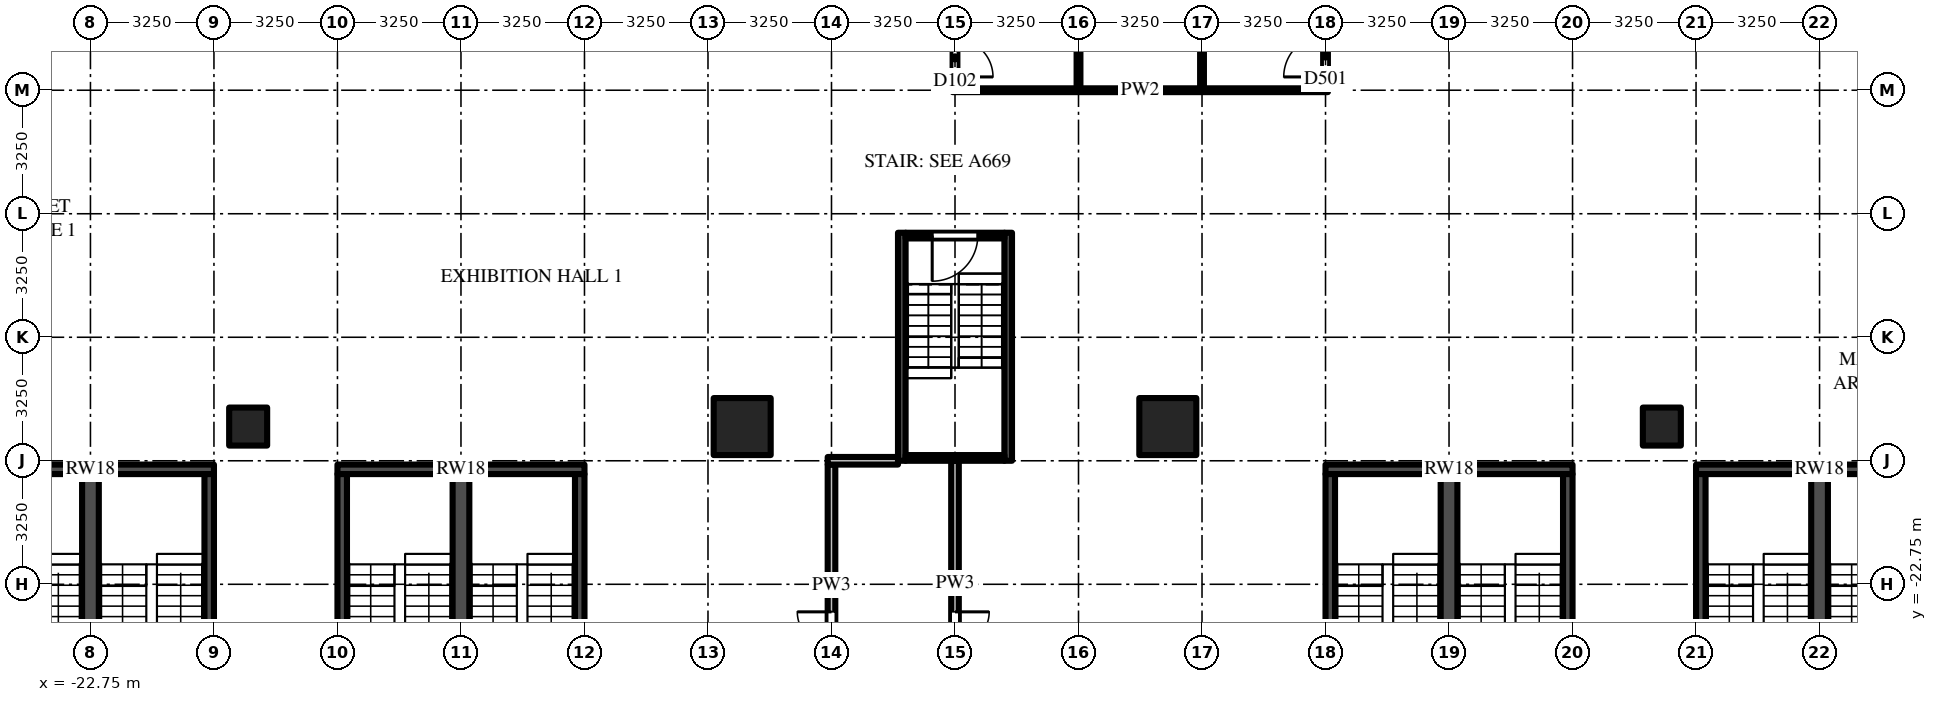
"""IFC4 building model, lengths in metres.
Left out: names, types, materials, properties, quantities, classifications, styles, units other than length and angle.
Written with IfcOpenShell. Run it as: python <this file> out.ifc"""

import sys

from ifc_helpers import new_model, si_unit, direction, frame, frame_2d, origin, origin_2d, place, context, subcontext, project, spatial, rectangle, extrude, source, transform, mapped, element, fill, save


model = new_model("IFC4")
c1 = context("Model", 3, precision=1e-05, world=origin(), true_north=direction((0.0, 1.0)))
c2 = subcontext(c1, "Body", "Model", "MODEL_VIEW")
j1 = project(units=[si_unit("LENGTHUNIT", "METRE"), si_unit("PLANEANGLEUNIT", "RADIAN")], contexts=[c1])
p1 = place(None, origin())
s1 = spatial("IfcSite", under=j1, at=p1, CompositionType="ELEMENT")
p2 = place(p1, origin())
s2 = spatial("IfcBuilding", under=s1, at=p2, CompositionType="ELEMENT")
p3 = place(p2, frame((0.0, 0.0, 24.0)))
s3 = spatial("IfcBuildingStorey", under=s2, at=p3, CompositionType="ELEMENT", Elevation=24.0)
m1 = source(origin(), c2, "Body", "SweptSolid", [
    extrude(rectangle(XDim=1.5, YDim=1.5, at=origin_2d()), origin(), (0.0, 0.0, 1.0), 5.0),
])
p4 = place(p3, frame((5.6, -18.6, 0.0), z_axis=(0.0, 0.0, 1.0), x_axis=(1.0, 0.0, 0.0)))
e1 = element("IfcColumn", 1, at=p4, inside=s3, PredefinedType="COLUMN", context=c2, shape_type="MappedRepresentation", body=[
    mapped(m1, transform((0.0, 0.0, 0.0))),
])
m2 = source(origin(), c2, "Body", "SweptSolid", [
    extrude(rectangle(XDim=1.0, YDim=1.0, at=origin_2d()), origin(), (0.0, 0.0, 1.0), 5.0),
])
p5 = place(p3, frame((18.6, -18.6, 0.0), z_axis=(0.0, 0.0, 1.0), x_axis=(1.0, 0.0, 0.0)))
e2 = element("IfcColumn", 2, at=p5, inside=s3, PredefinedType="COLUMN", context=c2, shape_type="MappedRepresentation", body=[
    mapped(m2, transform((0.0, 0.0, 0.0))),
])
p6 = place(p3, frame((-5.6, -18.6, 0.0), z_axis=(0.0, 0.0, 1.0), x_axis=(1.0, 0.0, 0.0)))
e3 = element("IfcColumn", 3, at=p6, inside=s3, PredefinedType="COLUMN", context=c2, shape_type="MappedRepresentation", body=[
    mapped(m1, transform((0.0, 0.0, 0.0))),
])
p7 = place(p3, frame((-18.6, -18.6, 0.0), z_axis=(0.0, 0.0, 1.0), x_axis=(1.0, 0.0, 0.0)))
e4 = element("IfcColumn", 4, at=p7, inside=s3, PredefinedType="COLUMN", context=c2, shape_type="MappedRepresentation", body=[
    mapped(m2, transform((0.0, 0.0, 0.0))),
])
m3 = source(origin(), c2, "Body", "SweptSolid", [
    extrude(rectangle(XDim=6.0, YDim=0.2, at=frame_2d((3.0, 0.0))), origin(), (0.0, 0.0, 1.0), 4.7),
])
for number, where, z_axis, x_axis in (
    (5, (1.4, -13.5, 0.0), (0.0, 0.0, 1.0), (0.0, -1.0, 0.0)),
    (6, (-1.4, -13.5, 0.0), (0.0, 0.0, 1.0), (0.0, -1.0, 0.0)),
):
    element("IfcWall", number, at=place(p3, frame(where, z_axis=z_axis, x_axis=x_axis)), inside=s3, PredefinedType="SHEAR", context=c2, shape_type="MappedRepresentation", body=[
        mapped(m3, transform((0.0, 0.0, 0.0))),
    ])
m4 = source(origin(), c2, "Body", "SweptSolid", [
    extrude(rectangle(XDim=2.6, YDim=0.15, at=frame_2d((1.3, 0.0))), origin(), (0.0, 0.0, 1.0), 4.7),
])
p8 = place(p3, frame((1.3, -13.575, 0.0), z_axis=(0.0, 0.0, 1.0), x_axis=(-1.0, 0.0, 0.0)))
e7 = element("IfcWall", 7, at=p8, inside=s3, PredefinedType="SHEAR", context=c2, shape_type="MappedRepresentation", body=[
    mapped(m4, transform((0.0, 0.0, 0.0))),
])
m5 = source(origin(), c2, "Body", "SweptSolid", [
    extrude(rectangle(XDim=1.2, YDim=2.1, at=frame_2d((0.6, 1.05))), frame((0.0, 0.085, 0.0), z_axis=(0.0, -1.0, 0.0), x_axis=(1.0, 0.0, 0.0)), (0.0, 0.0, 1.0), 0.17),
])
p9 = place(p8, frame((0.7, 0.0, 0.0)))
e8 = element("IfcOpeningElement", 8, at=p9, cuts=e7, PredefinedType="OPENING", context=c2, shape_type="MappedRepresentation", body=[
    mapped(m5, transform((0.0, 0.0, 0.0))),
])
p10 = place(p3, frame((1.3, -19.425, 0.0), z_axis=(0.0, 0.0, 1.0), x_axis=(-1.0, 0.0, 0.0)))
e9 = element("IfcWall", 9, at=p10, inside=s3, PredefinedType="SHEAR", context=c2, shape_type="MappedRepresentation", body=[
    mapped(m4, transform((0.0, 0.0, 0.0))),
])
m6 = source(origin(), c2, "Body", "SweptSolid", [
    extrude(rectangle(XDim=6.5, YDim=0.25, at=frame_2d((3.25, 0.0))), origin(), (0.0, 0.0, 1.0), 4.7),
])
p11 = place(p3, frame((-26.0, -19.725, 0.0), z_axis=(0.0, 0.0, 1.0), x_axis=(1.0, 0.0, 0.0)))
e10 = element("IfcWall", 10, at=p11, inside=s3, PredefinedType="SHEAR", context=c2, shape_type="MappedRepresentation", body=[
    mapped(m6, transform((0.0, 0.0, 0.0))),
])
m7 = source(origin(), c2, "Body", "SweptSolid", [
    extrude(rectangle(XDim=8.3, YDim=0.25, at=frame_2d((4.15, 0.0))), origin(), (0.0, 0.0, 1.0), 4.7),
])
p12 = place(p3, frame((-19.625, -28.15, 0.0), z_axis=(0.0, 0.0, 1.0), x_axis=(0.0, 1.0, 0.0)))
e11 = element("IfcWall", 11, at=p12, inside=s3, PredefinedType="SHEAR", context=c2, shape_type="MappedRepresentation", body=[
    mapped(m7, transform((0.0, 0.0, 0.0))),
])
m8 = source(origin(), c2, "Body", "SweptSolid", [
    extrude(rectangle(XDim=8.3, YDim=0.44, at=frame_2d((4.15, 0.0))), origin(), (0.0, 0.0, 1.0), 4.7),
])
p13 = place(p3, frame((-22.75, -28.15, 0.0), z_axis=(0.0, 0.0, 1.0), x_axis=(0.0, 1.0, 0.0)))
e12 = element("IfcWall", 12, at=p13, inside=s3, PredefinedType="SHEAR", context=c2, shape_type="MappedRepresentation", body=[
    mapped(m8, transform((0.0, 0.0, 0.0))),
])
p14 = place(p3, frame((-16.25, -19.725, 0.0), z_axis=(0.0, 0.0, 1.0), x_axis=(1.0, 0.0, 0.0)))
e13 = element("IfcWall", 13, at=p14, inside=s3, PredefinedType="SHEAR", context=c2, shape_type="MappedRepresentation", body=[
    mapped(m6, transform((0.0, 0.0, 0.0))),
])
for number, where, z_axis, x_axis in (
    (14, (-16.125, -28.15, 0.0), (0.0, 0.0, 1.0), (0.0, 1.0, 0.0)),
    (15, (-9.875, -28.15, 0.0), (0.0, 0.0, 1.0), (0.0, 1.0, 0.0)),
):
    element("IfcWall", number, at=place(p3, frame(where, z_axis=z_axis, x_axis=x_axis)), inside=s3, PredefinedType="SHEAR", context=c2, shape_type="MappedRepresentation", body=[
        mapped(m7, transform((0.0, 0.0, 0.0))),
    ])
p15 = place(p3, frame((-13.0, -28.15, 0.0), z_axis=(0.0, 0.0, 1.0), x_axis=(0.0, 1.0, 0.0)))
e16 = element("IfcWall", 16, at=p15, inside=s3, PredefinedType="SHEAR", context=c2, shape_type="MappedRepresentation", body=[
    mapped(m8, transform((0.0, 0.0, 0.0))),
])
p16 = place(p3, frame((9.75, -19.725, 0.0), z_axis=(0.0, 0.0, 1.0), x_axis=(1.0, 0.0, 0.0)))
e17 = element("IfcWall", 17, at=p16, inside=s3, PredefinedType="SHEAR", context=c2, shape_type="MappedRepresentation", body=[
    mapped(m6, transform((0.0, 0.0, 0.0))),
])
for number, where, z_axis, x_axis in (
    (18, (9.875, -28.15, 0.0), (0.0, 0.0, 1.0), (0.0, 1.0, 0.0)),
    (19, (16.125, -28.15, 0.0), (0.0, 0.0, 1.0), (0.0, 1.0, 0.0)),
):
    element("IfcWall", number, at=place(p3, frame(where, z_axis=z_axis, x_axis=x_axis)), inside=s3, PredefinedType="SHEAR", context=c2, shape_type="MappedRepresentation", body=[
        mapped(m7, transform((0.0, 0.0, 0.0))),
    ])
p17 = place(p3, frame((13.0, -28.15, 0.0), z_axis=(0.0, 0.0, 1.0), x_axis=(0.0, 1.0, 0.0)))
e20 = element("IfcWall", 20, at=p17, inside=s3, PredefinedType="SHEAR", context=c2, shape_type="MappedRepresentation", body=[
    mapped(m8, transform((0.0, 0.0, 0.0))),
])
p18 = place(p3, frame((19.5, -19.725, 0.0), z_axis=(0.0, 0.0, 1.0), x_axis=(1.0, 0.0, 0.0)))
e21 = element("IfcWall", 21, at=p18, inside=s3, PredefinedType="SHEAR", context=c2, shape_type="MappedRepresentation", body=[
    mapped(m6, transform((0.0, 0.0, 0.0))),
])
p19 = place(p3, frame((19.625, -28.15, 0.0), z_axis=(0.0, 0.0, 1.0), x_axis=(0.0, 1.0, 0.0)))
e22 = element("IfcWall", 22, at=p19, inside=s3, PredefinedType="SHEAR", context=c2, shape_type="MappedRepresentation", body=[
    mapped(m7, transform((0.0, 0.0, 0.0))),
])
p20 = place(p3, frame((22.75, -28.15, 0.0), z_axis=(0.0, 0.0, 1.0), x_axis=(0.0, 1.0, 0.0)))
e23 = element("IfcWall", 23, at=p20, inside=s3, PredefinedType="SHEAR", context=c2, shape_type="MappedRepresentation", body=[
    mapped(m8, transform((0.0, 0.0, 0.0))),
])
m9 = source(origin(), c2, "Body", "SweptSolid", [
    extrude(rectangle(XDim=3.188, YDim=0.2, at=frame_2d((1.594, 0.0))), origin(), (0.0, 0.0, 1.0), 4.7),
])
p21 = place(p3, frame((-3.25, -25.938, 0.0), z_axis=(0.0, 0.0, 1.0), x_axis=(0.0, 1.0, 0.0)))
e24 = element("IfcWall", 24, at=p21, inside=s3, PredefinedType="PARTITIONING", context=c2, shape_type="MappedRepresentation", body=[
    mapped(m9, transform((0.0, 0.0, 0.0))),
])
m10 = source(origin(), c2, "Body", "SweptSolid", [
    extrude(rectangle(XDim=1.8, YDim=2.1, at=frame_2d((0.9, 1.05))), frame((0.0, 0.11, 0.0), z_axis=(0.0, -1.0, 0.0), x_axis=(1.0, 0.0, 0.0)), (0.0, 0.0, 1.0), 0.22),
])
p22 = place(p21, frame((0.663, 0.0, 0.0)))
e25 = element("IfcOpeningElement", 25, at=p22, cuts=e24, PredefinedType="OPENING", context=c2, shape_type="MappedRepresentation", body=[
    mapped(m10, transform((0.0, 0.0, 0.0))),
])
m11 = source(origin(), c2, "Body", "SweptSolid", [
    extrude(rectangle(XDim=3.15, YDim=0.2, at=frame_2d((1.575, 0.0))), origin(), (0.0, 0.0, 1.0), 4.7),
])
p23 = place(p3, frame((-3.25, -22.75, 0.0), z_axis=(0.0, 0.0, 1.0), x_axis=(0.0, 1.0, 0.0)))
e26 = element("IfcWall", 26, at=p23, inside=s3, PredefinedType="PARTITIONING", context=c2, shape_type="MappedRepresentation", body=[
    mapped(m11, transform((0.0, 0.0, 0.0))),
])
m12 = source(origin(), c2, "Body", "SweptSolid", [
    extrude(rectangle(XDim=3.188, YDim=0.2, at=frame_2d((1.594, 0.0))), origin(), (0.0, 0.0, 1.0), 3.996),
])
p24 = place(p3, frame((0.0, -22.75, 0.0), z_axis=(0.0, 0.0, 1.0), x_axis=(0.0, -1.0, 0.0)))
e27 = element("IfcWall", 27, at=p24, inside=s3, PredefinedType="PARTITIONING", context=c2, shape_type="MappedRepresentation", body=[
    mapped(m12, transform((0.0, 0.0, 0.0))),
])
p25 = place(p24, frame((0.725, 0.0, 0.0)))
e28 = element("IfcOpeningElement", 28, at=p25, cuts=e27, PredefinedType="OPENING", context=c2, shape_type="MappedRepresentation", body=[
    mapped(m10, transform((0.0, 0.0, 0.0))),
])
m13 = source(origin(), c2, "Body", "SweptSolid", [
    extrude(rectangle(XDim=3.25, YDim=0.2, at=frame_2d((1.625, 0.0))), origin(), (0.0, 0.0, 1.0), 3.996),
])
p26 = place(p3, frame((0.0, -22.75, 0.0), z_axis=(0.0, 0.0, 1.0), x_axis=(0.0, 1.0, 0.0)))
e29 = element("IfcWall", 29, at=p26, inside=s3, PredefinedType="PARTITIONING", context=c2, shape_type="MappedRepresentation", body=[
    mapped(m13, transform((0.0, 0.0, 0.0))),
])
m14 = source(origin(), c2, "Body", "SweptSolid", [
    extrude(rectangle(XDim=3.137, YDim=0.125, at=frame_2d((1.569, 0.0))), origin(), (0.0, 0.0, 1.0), 4.077),
])
p27 = place(p3, frame((0.0, -6.562, 0.0), z_axis=(0.0, 0.0, 1.0), x_axis=(0.0, -1.0, 0.0)))
e30 = element("IfcWall", 30, at=p27, inside=s3, PredefinedType="PARTITIONING", context=c2, shape_type="MappedRepresentation", body=[
    mapped(m14, transform((0.0, 0.0, 0.0))),
])
m15 = source(origin(), c2, "Body", "SweptSolid", [
    extrude(rectangle(XDim=1.0, YDim=2.1, at=frame_2d((0.5, 1.05))), frame((0.0, 0.073, 0.0), z_axis=(0.0, -1.0, 0.0), x_axis=(1.0, 0.0, 0.0)), (0.0, 0.0, 1.0), 0.145),
])
p28 = place(p27, frame((1.837, 0.0, 0.0)))
e31 = element("IfcOpeningElement", 31, at=p28, cuts=e30, PredefinedType="OPENING", context=c2, shape_type="MappedRepresentation", body=[
    mapped(m15, transform((0.0, 0.0, 0.0))),
])
m16 = source(origin(), c2, "Body", "SweptSolid", [
    extrude(rectangle(XDim=3.137, YDim=0.1, at=frame_2d((1.569, 0.0))), origin(), (0.0, 0.0, 1.0), 4.7),
])
p29 = place(p3, frame((3.25, -9.7, 0.0), z_axis=(0.0, 0.0, 1.0), x_axis=(0.0, 1.0, 0.0)))
e32 = element("IfcWall", 32, at=p29, inside=s3, PredefinedType="PARTITIONING", context=c2, shape_type="MappedRepresentation", body=[
    mapped(m16, transform((0.0, 0.0, 0.0))),
])
m17 = source(origin(), c2, "Body", "SweptSolid", [
    extrude(rectangle(XDim=3.137, YDim=0.1, at=frame_2d((1.569, 0.0))), origin(), (0.0, 0.0, 1.0), 3.996),
])
p30 = place(p3, frame((6.5, -9.7, 0.0), z_axis=(0.0, 0.0, 1.0), x_axis=(0.0, 1.0, 0.0)))
e33 = element("IfcWall", 33, at=p30, inside=s3, PredefinedType="PARTITIONING", context=c2, shape_type="MappedRepresentation", body=[
    mapped(m17, transform((0.0, 0.0, 0.0))),
])
m18 = source(origin(), c2, "Body", "SweptSolid", [
    extrude(rectangle(XDim=3.2, YDim=0.125, at=frame_2d((1.6, 0.0))), origin(), (0.0, 0.0, 1.0), 3.996),
])
p31 = place(p3, frame((9.75, -9.7, 0.0), z_axis=(0.0, 0.0, 1.0), x_axis=(0.0, 1.0, 0.0)))
e34 = element("IfcWall", 34, at=p31, inside=s3, PredefinedType="PARTITIONING", context=c2, shape_type="MappedRepresentation", body=[
    mapped(m18, transform((0.0, 0.0, 0.0))),
])
m19 = source(origin(), c2, "Body", "SweptSolid", [
    extrude(rectangle(XDim=1.1, YDim=2.1, at=frame_2d((0.55, 1.05))), frame((0.0, 0.073, 0.0), z_axis=(0.0, -1.0, 0.0), x_axis=(1.0, 0.0, 0.0)), (0.0, 0.0, 1.0), 0.145),
])
p32 = place(p31, frame((0.3, 0.0, 0.0)))
e35 = element("IfcOpeningElement", 35, at=p32, cuts=e34, PredefinedType="OPENING", context=c2, shape_type="MappedRepresentation", body=[
    mapped(m19, transform((0.0, 0.0, 0.0))),
])
m20 = source(origin(), c2, "Body", "SweptSolid", [
    extrude(rectangle(XDim=1.85, YDim=0.2, at=frame_2d((0.925, 0.0))), origin(), (0.0, 0.0, 1.0), 3.996),
])
p33 = place(p3, frame((-3.35, -19.5, 0.0), z_axis=(0.0, 0.0, 1.0), x_axis=(1.0, 0.0, 0.0)))
e36 = element("IfcWall", 36, at=p33, inside=s3, PredefinedType="PARTITIONING", context=c2, shape_type="MappedRepresentation", body=[
    mapped(m20, transform((0.0, 0.0, 0.0))),
])
m21 = source(origin(), c2, "Body", "SweptSolid", [
    extrude(rectangle(XDim=9.875, YDim=0.1, at=frame_2d((4.938, 0.0))), origin(), (0.0, 0.0, 1.0), 3.762),
])
p34 = place(p3, frame((-0.062, -9.75, 0.0), z_axis=(0.0, 0.0, 1.0), x_axis=(1.0, 0.0, 0.0)))
e37 = element("IfcWall", 37, at=p34, inside=s3, PredefinedType="PARTITIONING", context=c2, shape_type="MappedRepresentation", body=[
    mapped(m21, transform((0.0, 0.0, 0.0))),
])
m22 = source(origin(), c2, "Body", "SweptSolid", [
    extrude(rectangle(XDim=1.2, YDim=2.1, at=frame_2d((0.6, 1.05))), frame((0.0, 0.025, 0.0), z_axis=(0.0, -1.0, 0.0), x_axis=(1.0, 0.0, 0.0)), (0.0, 0.0, 1.0), 0.05),
])
p35 = place(p9, origin())
e38 = element("IfcDoor", 38, at=p35, inside=s3, OperationType="SINGLE_SWING_RIGHT", PredefinedType="DOOR", context=c2, shape_type="MappedRepresentation", body=[
    mapped(m22, transform((0.0, 0.0, 0.0))),
])
fill(e8, e38)
m23 = source(origin(), c2, "Body", "SweptSolid", [
    extrude(rectangle(XDim=1.8, YDim=2.1, at=frame_2d((0.9, 1.05))), frame((0.0, 0.025, 0.0), z_axis=(0.0, -1.0, 0.0), x_axis=(1.0, 0.0, 0.0)), (0.0, 0.0, 1.0), 0.05),
])
p36 = place(p22, origin())
e39 = element("IfcDoor", 39, at=p36, inside=s3, OperationType="DOUBLE_DOOR_SINGLE_SWING", PredefinedType="DOOR", context=c2, shape_type="MappedRepresentation", body=[
    mapped(m23, transform((0.0, 0.0, 0.0))),
])
fill(e25, e39)
p37 = place(p25, origin())
e40 = element("IfcDoor", 40, at=p37, inside=s3, OperationType="DOUBLE_DOOR_SINGLE_SWING", PredefinedType="DOOR", context=c2, shape_type="MappedRepresentation", body=[
    mapped(m23, transform((0.0, 0.0, 0.0))),
])
fill(e28, e40)
m24 = source(origin(), c2, "Body", "SweptSolid", [
    extrude(rectangle(XDim=1.0, YDim=2.1, at=frame_2d((0.5, 1.05))), frame((0.0, 0.025, 0.0), z_axis=(0.0, -1.0, 0.0), x_axis=(1.0, 0.0, 0.0)), (0.0, 0.0, 1.0), 0.05),
])
p38 = place(p28, origin())
e41 = element("IfcDoor", 41, at=p38, inside=s3, OperationType="SINGLE_SWING_RIGHT", PredefinedType="DOOR", context=c2, shape_type="MappedRepresentation", body=[
    mapped(m24, transform((0.0, 0.0, 0.0))),
])
fill(e31, e41)
m25 = source(origin(), c2, "Body", "SweptSolid", [
    extrude(rectangle(XDim=1.1, YDim=2.1, at=frame_2d((0.55, 1.05))), frame((0.0, 0.025, 0.0), z_axis=(0.0, -1.0, 0.0), x_axis=(1.0, 0.0, 0.0)), (0.0, 0.0, 1.0), 0.05),
])
p39 = place(p32, origin())
e42 = element("IfcDoor", 42, at=p39, inside=s3, OperationType="SINGLE_SWING_LEFT", PredefinedType="DOOR", context=c2, shape_type="MappedRepresentation", body=[
    mapped(m25, transform((0.0, 0.0, 0.0))),
])
fill(e35, e42)
save(model, sys.argv[1])
